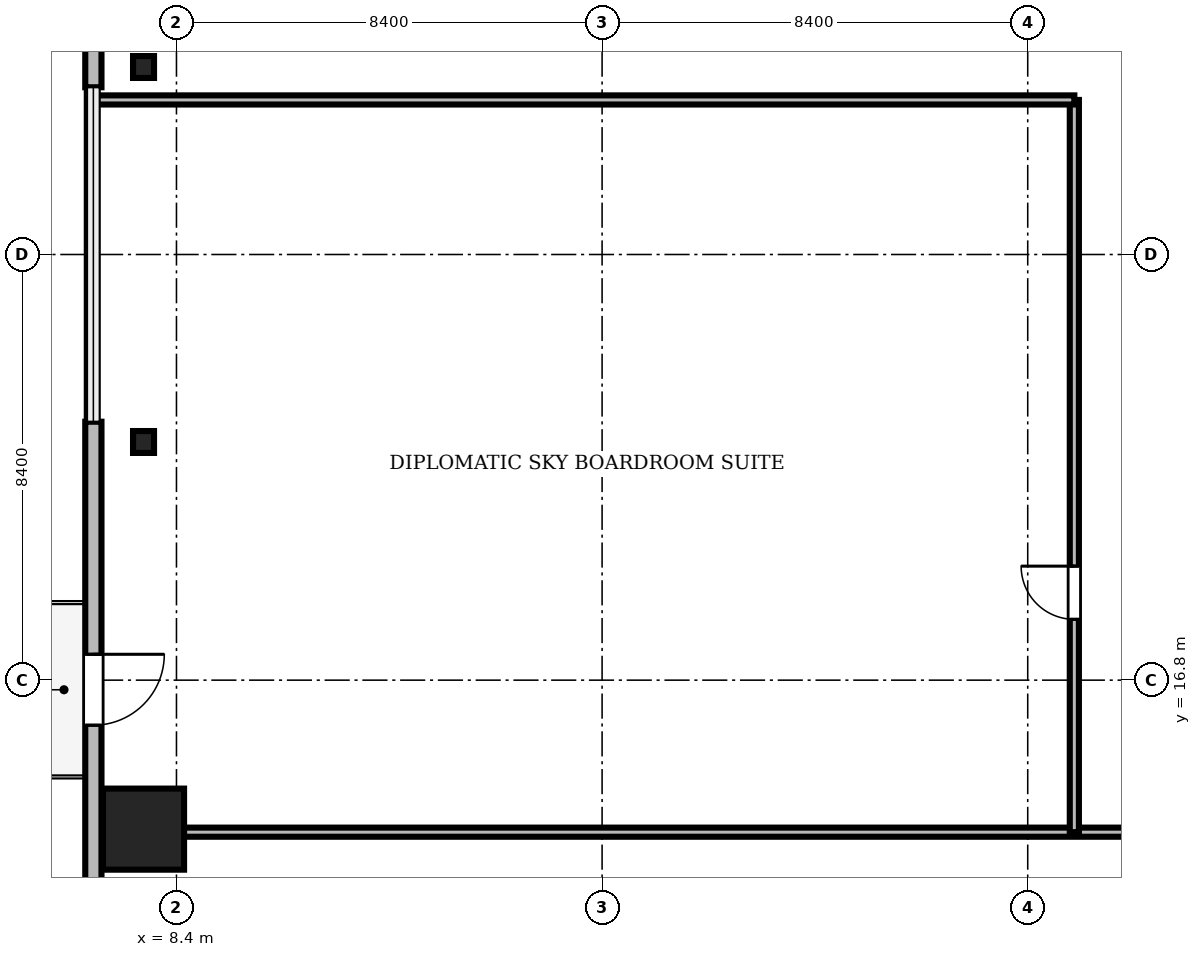
"""IFC4 building model, lengths in metres.
Left out: names, types, materials, properties, quantities, classifications, styles, units other than length and angle.
Written with IfcOpenShell. Run it as: python <this file> out.ifc"""

import sys

from ifc_helpers import new_model, si_unit, direction, frame, frame_2d, origin, origin_2d, place, context, subcontext, project, spatial, rectangle, i_section, extrude, source, transform, mapped, element, fill, save


model = new_model("IFC4")
c1 = context("Model", 3, precision=1e-05, world=origin(), true_north=direction((0.0, 1.0)))
c2 = subcontext(c1, "Body", "Model", "MODEL_VIEW")
j1 = project(units=[si_unit("LENGTHUNIT", "METRE"), si_unit("PLANEANGLEUNIT", "RADIAN")], contexts=[c1])
p1 = place(None, origin())
s1 = spatial("IfcSite", under=j1, at=p1, CompositionType="ELEMENT")
p2 = place(p1, origin())
s2 = spatial("IfcBuilding", under=s1, at=p2, CompositionType="ELEMENT")
p3 = place(p2, frame((0.0, 0.0, 98.7)))
s3 = spatial("IfcBuildingStorey", under=s2, at=p3, CompositionType="ELEMENT", Elevation=98.7)
m1 = source(origin(), c2, "Body", "SweptSolid", [
    extrude(rectangle(XDim=1.6, YDim=1.6, at=origin_2d()), origin(), (0.0, 0.0, 1.0), 4.76),
])
p4 = place(p3, frame((7.75, 13.86, 0.0), z_axis=(0.0, 0.0, 1.0), x_axis=(1.0, 0.0, 0.0)))
e1 = element("IfcColumn", 1, at=p4, inside=s3, PredefinedType="COLUMN", context=c2, shape_type="MappedRepresentation", body=[
    mapped(m1, transform((0.0, 0.0, 0.0), scale=1.0)),
])
m2 = source(origin(), c2, "Body", "SweptSolid", [
    extrude(i_section(OverallWidth=0.414, OverallDepth=0.432, WebThickness=0.026, FlangeThickness=0.04, FilletRadius=0.015, at=origin_2d()), origin(), (0.0, 0.0, 1.0), 4.76),
])
for number, where, z_axis, x_axis in (
    (2, (7.75, 28.9, 0.0), (0.0, 0.0, 1.0), (1.0, 0.0, 0.0)),
    (3, (7.75, 21.5, 0.0), (0.0, 0.0, 1.0), (1.0, 0.0, 0.0)),
):
    element("IfcColumn", number, at=place(p3, frame(where, z_axis=z_axis, x_axis=x_axis)), inside=s3, PredefinedType="COLUMN", context=c2, shape_type="MappedRepresentation", body=[
        mapped(m2, transform((0.0, 0.0, 0.0), scale=1.0)),
    ])
m3 = source(origin(), c2, "Body", "SweptSolid", [
    extrude(rectangle(XDim=15.6, YDim=0.32, at=frame_2d((7.8, 0.0))), origin(), (0.0, 0.0, 1.0), 4.76),
])
p5 = place(p3, frame((6.76, 44.1, 0.0), z_axis=(0.0, 0.0, 1.0), x_axis=(0.0, -1.0, 0.0)))
e4 = element("IfcWall", 4, at=p5, inside=s3, PredefinedType="SOLIDWALL", context=c2, shape_type="MappedRepresentation", body=[
    mapped(m3, transform((0.0, 0.0, 0.0), scale=1.0)),
])
m4 = source(origin(), c2, "Body", "SweptSolid", [
    extrude(rectangle(XDim=2.2, YDim=2.4, at=frame_2d((1.1, 1.2))), frame((0.0, 0.17, 0.0), z_axis=(0.0, -1.0, 0.0), x_axis=(1.0, 0.0, 0.0)), (0.0, 0.0, 1.0), 0.34),
])
p6 = place(p5, frame((2.105, 0.0, 0.72)))
e5 = element("IfcOpeningElement", 5, at=p6, cuts=e4, PredefinedType="OPENING", context=c2, shape_type="MappedRepresentation", body=[
    mapped(m4, transform((0.0, 0.0, 0.0), scale=1.0)),
])
m5 = source(origin(), c2, "Body", "SweptSolid", [
    extrude(rectangle(XDim=15.6, YDim=0.32, at=frame_2d((7.8, 0.0))), origin(), (0.0, 0.0, 1.0), 4.76),
])
p7 = place(p3, frame((6.76, 21.9, 0.0), z_axis=(0.0, 0.0, 1.0), x_axis=(0.0, -1.0, 0.0)))
e6 = element("IfcWall", 6, at=p7, inside=s3, PredefinedType="SOLIDWALL", context=c2, shape_type="MappedRepresentation", body=[
    mapped(m5, transform((0.0, 0.0, 0.0), scale=1.0)),
])
m6 = source(origin(), c2, "Body", "SweptSolid", [
    extrude(rectangle(XDim=1.4, YDim=2.3, at=frame_2d((0.7, 1.15))), frame((0.0, 0.17, 0.0), z_axis=(0.0, -1.0, 0.0), x_axis=(1.0, 0.0, 0.0)), (0.0, 0.0, 1.0), 0.34),
])
p8 = place(p7, frame((4.59, 0.0, 0.0)))
e7 = element("IfcOpeningElement", 7, at=p8, cuts=e6, PredefinedType="OPENING", context=c2, shape_type="MappedRepresentation", body=[
    mapped(m6, transform((0.0, 0.0, 0.0), scale=1.0)),
])
p9 = place(p7, frame((10.395, 0.0, 0.72)))
e8 = element("IfcOpeningElement", 8, at=p9, cuts=e6, PredefinedType="OPENING", context=c2, shape_type="MappedRepresentation", body=[
    mapped(m4, transform((0.0, 0.0, 0.0), scale=1.0)),
])
m7 = source(origin(), c2, "Body", "SweptSolid", [
    extrude(rectangle(XDim=46.1, YDim=0.18, at=frame_2d((23.05, 0.0))), origin(), (0.0, 0.0, 1.0), 4.002),
])
p10 = place(p3, frame((6.95, 13.8, 0.0), z_axis=(0.0, 0.0, 1.0), x_axis=(1.0, 0.0, 0.0)))
e9 = element("IfcWall", 9, at=p10, inside=s3, PredefinedType="PARTITIONING", context=c2, shape_type="MappedRepresentation", body=[
    mapped(m7, transform((0.0, 0.0, 0.0), scale=1.0)),
])
m8 = source(origin(), c2, "Body", "SweptSolid", [
    extrude(rectangle(XDim=1.8, YDim=2.4, at=frame_2d((0.9, 1.2))), frame((0.0, 0.1, 0.0), z_axis=(0.0, -1.0, 0.0), x_axis=(1.0, 0.0, 0.0)), (0.0, 0.0, 1.0), 0.2),
])
p11 = place(p10, frame((20.65, 0.0, 0.0)))
e10 = element("IfcOpeningElement", 10, at=p11, cuts=e9, PredefinedType="OPENING", context=c2, shape_type="MappedRepresentation", body=[
    mapped(m8, transform((0.0, 0.0, 0.0), scale=1.0)),
])
p12 = place(p10, frame((35.25, 0.0, 0.0)))
e11 = element("IfcOpeningElement", 11, at=p12, cuts=e9, PredefinedType="OPENING", context=c2, shape_type="MappedRepresentation", body=[
    mapped(m8, transform((0.0, 0.0, 0.0), scale=1.0)),
])
m9 = source(origin(), c2, "Body", "SweptSolid", [
    extrude(rectangle(XDim=14.45, YDim=0.18, at=frame_2d((7.225, 0.0))), origin(), (0.0, 0.0, 1.0), 4.152),
])
p13 = place(p3, frame((26.12, 13.8, 0.0), z_axis=(0.0, 0.0, 1.0), x_axis=(0.0, 1.0, 0.0)))
e12 = element("IfcWall", 12, at=p13, inside=s3, PredefinedType="PARTITIONING", context=c2, shape_type="MappedRepresentation", body=[
    mapped(m9, transform((0.0, 0.0, 0.0), scale=1.0)),
])
m10 = source(origin(), c2, "Body", "SweptSolid", [
    extrude(rectangle(XDim=1.05, YDim=2.2, at=frame_2d((0.525, 1.1))), frame((0.0, 0.1, 0.0), z_axis=(0.0, -1.0, 0.0), x_axis=(1.0, 0.0, 0.0)), (0.0, 0.0, 1.0), 0.2),
])
p14 = place(p13, frame((4.2, 0.0, 0.0)))
e13 = element("IfcOpeningElement", 13, at=p14, cuts=e12, PredefinedType="OPENING", context=c2, shape_type="MappedRepresentation", body=[
    mapped(m10, transform((0.0, 0.0, 0.0), scale=1.0)),
])
m11 = source(origin(), c2, "Body", "SweptSolid", [
    extrude(rectangle(XDim=19.4, YDim=0.18, at=frame_2d((9.7, 0.0))), origin(), (0.0, 0.0, 1.0), 4.002),
])
p15 = place(p3, frame((6.72, 28.25, 0.0), z_axis=(0.0, 0.0, 1.0), x_axis=(1.0, 0.0, 0.0)))
e14 = element("IfcWall", 14, at=p15, inside=s3, PredefinedType="PARTITIONING", context=c2, shape_type="MappedRepresentation", body=[
    mapped(m11, transform((0.0, 0.0, 0.0), scale=1.0)),
])
m12 = source(origin(), c2, "Body", "SweptSolid", [
    extrude(rectangle(XDim=1.4, YDim=2.3, at=frame_2d((0.7, 1.15))), frame((0.0, 0.025, 0.0), z_axis=(0.0, -1.0, 0.0), x_axis=(1.0, 0.0, 0.0)), (0.0, 0.0, 1.0), 0.05),
])
p16 = place(p8, frame((1.4, 0.0, 0.0), z_axis=(0.0, 0.0, 1.0), x_axis=(-1.0, 0.0, 0.0)))
e15 = element("IfcDoor", 15, at=p16, inside=s3, OperationType="DOUBLE_DOOR_SLIDING", PredefinedType="DOOR", context=c2, shape_type="MappedRepresentation", body=[
    mapped(m12, transform((0.0, 0.0, 0.0), scale=1.0)),
])
fill(e7, e15)
m13 = source(origin(), c2, "Body", "SweptSolid", [
    extrude(rectangle(XDim=1.05, YDim=2.2, at=frame_2d((0.525, 1.1))), frame((0.0, 0.025, 0.0), z_axis=(0.0, -1.0, 0.0), x_axis=(1.0, 0.0, 0.0)), (0.0, 0.0, 1.0), 0.05),
])
p17 = place(p14, origin())
e16 = element("IfcDoor", 16, at=p17, inside=s3, OperationType="SINGLE_SWING_RIGHT", PredefinedType="DOOR", context=c2, shape_type="MappedRepresentation", body=[
    mapped(m13, transform((0.0, 0.0, 0.0), scale=1.0)),
])
fill(e13, e16)
save(model, sys.argv[1])
